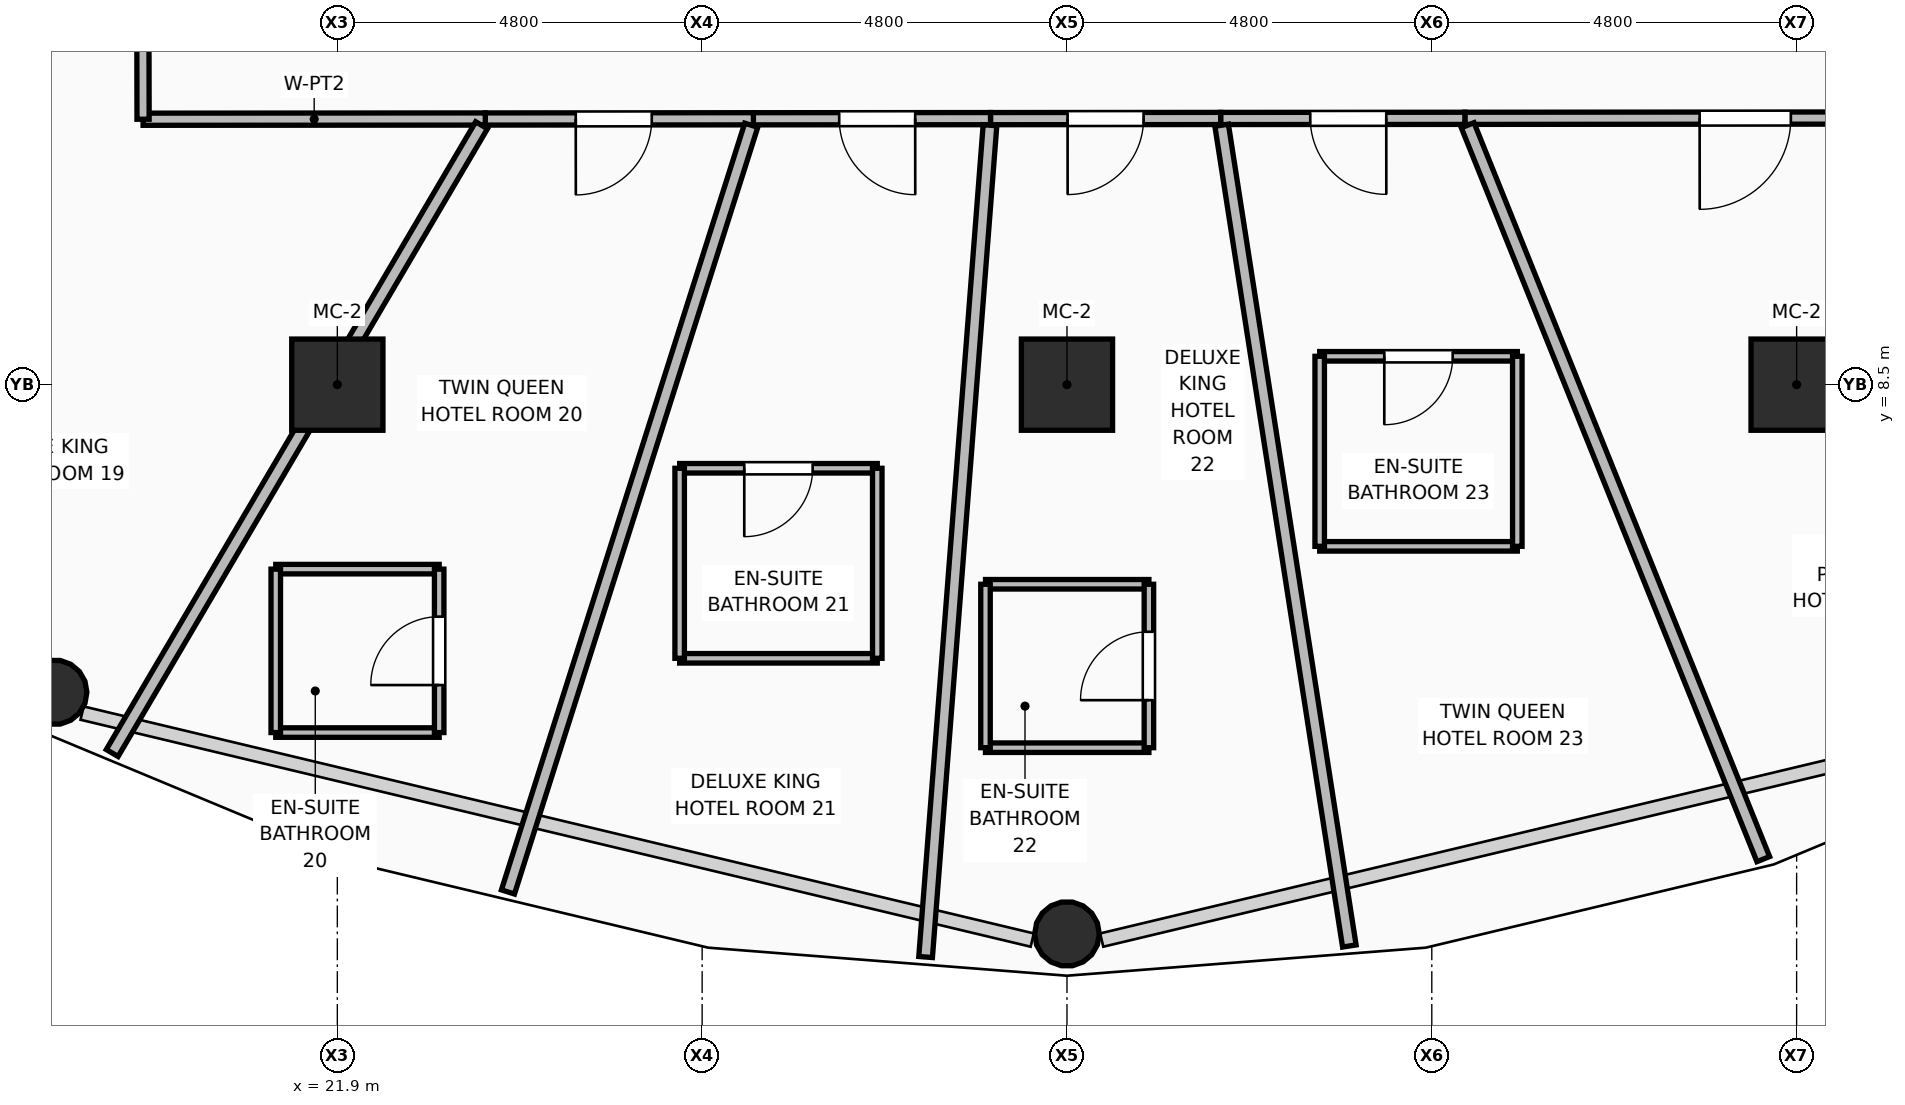
"""IFC4 building model, lengths in metres.
Left out: names, types, materials, properties, quantities, classifications, styles, units other than length and angle.
Written with IfcOpenShell. Run it as: python <this file> out.ifc"""

import sys

from ifc_helpers import new_model, si_unit, direction, frame, frame_2d, origin, origin_2d, place, context, subcontext, project, spatial, rectangle, hollow_rectangle, hollow_circle, extrude, element, fill, save


model = new_model("IFC4")
c1 = context("Model", 3, precision=1e-05, world=origin(), true_north=direction((0.0, 1.0)))
c2 = subcontext(c1, "Body", "Model", "MODEL_VIEW")
j1 = project(units=[si_unit("LENGTHUNIT", "METRE"), si_unit("PLANEANGLEUNIT", "RADIAN")], contexts=[c1])
p1 = place(None, origin())
s1 = spatial("IfcSite", under=j1, at=p1, CompositionType="ELEMENT")
p2 = place(p1, origin())
s2 = spatial("IfcBuilding", under=s1, at=p2, CompositionType="ELEMENT")
p3 = place(p2, frame((0.0, 0.0, 53.25)))
s3 = spatial("IfcBuildingStorey", under=s2, at=p3, CompositionType="ELEMENT", Elevation=53.25)
for number, where, z_axis, x_axis in (
    (1, (21.9, 8.5, 0.0), (0.0, 0.0, 1.0), (1.0, 0.0, 0.0)),
    (2, (31.5, 8.5, 0.0), (0.0, 0.0, 1.0), (1.0, 0.0, 0.0)),
    (3, (41.1, 8.5, 0.0), (0.0, 0.0, 1.0), (1.0, 0.0, 0.0)),
):
    element("IfcColumn", number, at=place(p3, frame(where, z_axis=z_axis, x_axis=x_axis)), inside=s3, PredefinedType="COLUMN", context=c2, shape_type="SweptSolid", body=[
        extrude(hollow_rectangle(XDim=1.2, YDim=1.2, WallThickness=0.045, at=origin_2d()), origin(), (0.0, 0.0, 1.0), 3.75),
    ])
p4 = place(p3, frame((18.18, 4.453, 0.0), z_axis=(-0.111309599924, -0.172151708361, 0.978761442985), x_axis=(0.839754063035, -0.542966954443, 0.0)))
e4 = element("IfcColumn", 4, at=p4, inside=s3, PredefinedType="COLUMN", context=c2, shape_type="SweptSolid", body=[
    extrude(hollow_circle(Radius=0.425, WallThickness=0.04, at=origin_2d()), origin(), (0.0, 0.0, 1.0), 3.647),
])
p5 = place(p3, frame((31.5, 1.274, 0.0), z_axis=(0.0, -0.198976453548, 0.980004270875), x_axis=(1.0, 0.0, 0.0)))
e5 = element("IfcColumn", 5, at=p5, inside=s3, PredefinedType="COLUMN", context=c2, shape_type="SweptSolid", body=[
    extrude(hollow_circle(Radius=0.425, WallThickness=0.04, at=origin_2d()), origin(), (0.0, 0.0, 1.0), 3.643),
])
p6 = place(p3, frame((43.673, 12.009, 0.0), z_axis=(0.0, 0.0, 1.0), x_axis=(-0.999999726963, -0.000738968058, 0.0)))
e6 = element("IfcWall", 6, at=p6, inside=s3, PredefinedType="PARTITIONING", context=c2, shape_type="SweptSolid", body=[
    extrude(rectangle(XDim=6.938, YDim=0.16, at=frame_2d((3.469, 0.0))), origin(), (0.0, 0.0, 1.0), 2.928),
])
p7 = place(p6, frame((2.649, 0.0, 0.0)))
e7 = element("IfcOpeningElement", 7, at=p7, cuts=e6, PredefinedType="OPENING", context=c2, shape_type="SweptSolid", body=[
    extrude(rectangle(XDim=1.2, YDim=2.1, at=frame_2d((0.6, 1.05))), frame((0.0, 0.09, 0.0), z_axis=(0.0, -1.0, 0.0), x_axis=(1.0, 0.0, 0.0)), (0.0, 0.0, 1.0), 0.18),
])
p8 = place(p3, frame((36.735, 12.004, 0.0), z_axis=(0.0, 0.0, 1.0), x_axis=(-0.999999815255, -0.000607856434, 0.0)))
e8 = element("IfcWall", 8, at=p8, inside=s3, PredefinedType="PARTITIONING", context=c2, shape_type="SweptSolid", body=[
    extrude(rectangle(XDim=3.213, YDim=0.16, at=frame_2d((1.606, 0.0))), origin(), (0.0, 0.0, 1.0), 3.55),
])
p9 = place(p8, frame((1.034, 0.0, 0.0)))
e9 = element("IfcOpeningElement", 9, at=p9, cuts=e8, PredefinedType="OPENING", context=c2, shape_type="SweptSolid", body=[
    extrude(rectangle(XDim=1.0, YDim=2.1, at=frame_2d((0.5, 1.05))), frame((0.0, 0.09, 0.0), z_axis=(0.0, -1.0, 0.0), x_axis=(1.0, 0.0, 0.0)), (0.0, 0.0, 1.0), 0.18),
])
p10 = place(p3, frame((33.522, 12.002, 0.0), z_axis=(0.0, 0.0, 1.0), x_axis=(-0.999999791984, -0.000645005106, 0.0)))
e10 = element("IfcWall", 10, at=p10, inside=s3, PredefinedType="PARTITIONING", context=c2, shape_type="SweptSolid", body=[
    extrude(rectangle(XDim=3.028, YDim=0.16, at=frame_2d((1.514, 0.0))), origin(), (0.0, 0.0, 1.0), 2.928),
])
p11 = place(p10, frame((1.014, 0.0, 0.0)))
e11 = element("IfcOpeningElement", 11, at=p11, cuts=e10, PredefinedType="OPENING", context=c2, shape_type="SweptSolid", body=[
    extrude(rectangle(XDim=1.0, YDim=2.1, at=frame_2d((0.5, 1.05))), frame((0.0, 0.09, 0.0), z_axis=(0.0, -1.0, 0.0), x_axis=(1.0, 0.0, 0.0)), (0.0, 0.0, 1.0), 0.18),
])
p12 = place(p3, frame((30.494, 12.0, 0.0), z_axis=(0.0, 0.0, 1.0), x_axis=(-0.999999804045, -0.000626026953, 0.0)))
e12 = element("IfcWall", 12, at=p12, inside=s3, PredefinedType="PARTITIONING", context=c2, shape_type="SweptSolid", body=[
    extrude(rectangle(XDim=3.12, YDim=0.16, at=frame_2d((1.56, 0.0))), origin(), (0.0, 0.0, 1.0), 3.55),
])
p13 = place(p12, frame((0.991, 0.0, 0.0)))
e13 = element("IfcOpeningElement", 13, at=p13, cuts=e12, PredefinedType="OPENING", context=c2, shape_type="SweptSolid", body=[
    extrude(rectangle(XDim=1.0, YDim=2.1, at=frame_2d((0.5, 1.05))), frame((0.0, 0.09, 0.0), z_axis=(0.0, -1.0, 0.0), x_axis=(1.0, 0.0, 0.0)), (0.0, 0.0, 1.0), 0.18),
])
p14 = place(p3, frame((27.374, 11.998, 0.0), z_axis=(0.0, 0.0, 1.0), x_axis=(-0.999999655033, -0.000830621988, 0.0)))
e14 = element("IfcWall", 14, at=p14, inside=s3, PredefinedType="PARTITIONING", context=c2, shape_type="SweptSolid", body=[
    extrude(rectangle(XDim=3.527, YDim=0.16, at=frame_2d((1.764, 0.0))), origin(), (0.0, 0.0, 1.0), 3.55),
])
p15 = place(p14, frame((1.337, 0.0, 0.0)))
e15 = element("IfcOpeningElement", 15, at=p15, cuts=e14, PredefinedType="OPENING", context=c2, shape_type="SweptSolid", body=[
    extrude(rectangle(XDim=1.0, YDim=2.1, at=frame_2d((0.5, 1.05))), frame((0.0, 0.09, 0.0), z_axis=(0.0, -1.0, 0.0), x_axis=(1.0, 0.0, 0.0)), (0.0, 0.0, 1.0), 0.18),
])
p16 = place(p3, frame((23.847, 11.995, 0.0), z_axis=(0.0, 0.0, 1.0), x_axis=(-0.999999751603, -0.000704836086, 0.0)))
e16 = element("IfcWall", 16, at=p16, inside=s3, PredefinedType="PARTITIONING", context=c2, shape_type="SweptSolid", body=[
    extrude(rectangle(XDim=4.503, YDim=0.16, at=frame_2d((2.251, 0.0))), origin(), (0.0, 0.0, 1.0), 2.928),
])
p17 = place(p3, frame((19.344, 11.992, 0.0), z_axis=(0.0, 0.0, 1.0), x_axis=(-0.001822295279, 0.999998339619, 0.0)))
e17 = element("IfcWall", 17, at=p17, inside=s3, PredefinedType="PARTITIONING", context=c2, shape_type="SweptSolid", body=[
    extrude(rectangle(XDim=4.421, YDim=0.16, at=frame_2d((2.21, 0.0))), origin(), (0.0, 0.0, 1.0), 3.55),
])
p18 = place(p17, frame((2.818, 0.0, 0.0)))
e18 = element("IfcOpeningElement", 18, at=p18, cuts=e17, PredefinedType="OPENING", context=c2, shape_type="SweptSolid", body=[
    extrude(rectangle(XDim=1.0, YDim=2.1, at=frame_2d((0.5, 1.05))), frame((0.0, 0.09, 0.0), z_axis=(0.0, -1.0, 0.0), x_axis=(1.0, 0.0, 0.0)), (0.0, 0.0, 1.0), 0.18),
])
p19 = place(p3, frame((19.248, 16.351, 0.0), z_axis=(0.0, 0.0, 1.0), x_axis=(-0.816958598031, -0.576696323123, 0.0)))
e19 = element("IfcWall", 19, at=p19, inside=s3, PredefinedType="PARTITIONING", context=c2, shape_type="SweptSolid", body=[
    extrude(rectangle(XDim=10.954, YDim=0.18, at=frame_2d((5.477, 0.0))), origin(), (0.0, 0.0, 1.0), 2.775),
])
p20 = place(p3, frame((23.798, 11.913, 0.0), z_axis=(0.0, 0.0, 1.0), x_axis=(-0.507163744978, -0.86184971763, 0.0)))
e20 = element("IfcWall", 20, at=p20, inside=s3, PredefinedType="PARTITIONING", context=c2, shape_type="SweptSolid", body=[
    extrude(rectangle(XDim=9.583, YDim=0.18, at=frame_2d((4.792, 0.0))), origin(), (0.0, 0.0, 1.0), 2.775),
])
p21 = place(p3, frame((27.346, 11.913, 0.0), z_axis=(0.0, 0.0, 1.0), x_axis=(-0.30246369842, -0.953160905166, 0.0)))
e21 = element("IfcWall", 21, at=p21, inside=s3, PredefinedType="PARTITIONING", context=c2, shape_type="SweptSolid", body=[
    extrude(rectangle(XDim=10.583, YDim=0.18, at=frame_2d((5.292, 0.0))), origin(), (0.0, 0.0, 1.0), 2.775),
])
p22 = place(p3, frame((30.487, 11.913, 0.0), z_axis=(0.0, 0.0, 1.0), x_axis=(-0.077184667338, -0.997016813864, 0.0)))
e22 = element("IfcWall", 22, at=p22, inside=s3, PredefinedType="PARTITIONING", context=c2, shape_type="SweptSolid", body=[
    extrude(rectangle(XDim=10.976, YDim=0.18, at=frame_2d((5.488, 0.0))), origin(), (0.0, 0.0, 1.0), 2.775),
])
p23 = place(p3, frame((33.535, 11.913, 0.0), z_axis=(0.0, 0.0, 1.0), x_axis=(0.153749177846, -0.988109908012, 0.0)))
e23 = element("IfcWall", 23, at=p23, inside=s3, PredefinedType="PARTITIONING", context=c2, shape_type="SweptSolid", body=[
    extrude(rectangle(XDim=10.928, YDim=0.18, at=frame_2d((5.464, 0.0))), origin(), (0.0, 0.0, 1.0), 2.775),
])
p24 = place(p3, frame((36.772, 11.913, 0.0), z_axis=(0.0, 0.0, 1.0), x_axis=(0.373617850664, -0.927582719581, 0.0)))
e24 = element("IfcWall", 24, at=p24, inside=s3, PredefinedType="PARTITIONING", context=c2, shape_type="SweptSolid", body=[
    extrude(rectangle(XDim=10.409, YDim=0.18, at=frame_2d((5.204, 0.0))), origin(), (0.0, 0.0, 1.0), 2.775),
])
for number, where, z_axis, x_axis in (
    (25, (21.09, 3.923, 0.0), (0.0, 0.0, 1.0), (1.0, 0.0, 0.0)),
    (26, (21.09, 6.073, 0.0), (0.0, 0.0, 1.0), (1.0, 0.0, 0.0)),
    (27, (21.09, 3.923, 0.0), (0.0, 0.0, 1.0), (0.0, 1.0, 0.0)),
):
    element("IfcWall", number, at=place(p3, frame(where, z_axis=z_axis, x_axis=x_axis)), inside=s3, PredefinedType="PARTITIONING", context=c2, shape_type="SweptSolid", body=[
        extrude(rectangle(XDim=2.15, YDim=0.125, at=frame_2d((1.075, 0.0))), origin(), (0.0, 0.0, 1.0), 3.55),
    ])
p25 = place(p3, frame((23.24, 3.923, 0.0), z_axis=(0.0, 0.0, 1.0), x_axis=(0.0, 1.0, 0.0)))
e28 = element("IfcWall", 28, at=p25, inside=s3, PredefinedType="PARTITIONING", context=c2, shape_type="SweptSolid", body=[
    extrude(rectangle(XDim=2.15, YDim=0.125, at=frame_2d((1.075, 0.0))), origin(), (0.0, 0.0, 1.0), 3.55),
])
p26 = place(p25, frame((0.625, 0.0, 0.0)))
e29 = element("IfcOpeningElement", 29, at=p26, cuts=e28, PredefinedType="OPENING", context=c2, shape_type="SweptSolid", body=[
    extrude(rectangle(XDim=0.9, YDim=2.1, at=frame_2d((0.45, 1.05))), frame((0.0, 0.073, 0.0), z_axis=(0.0, -1.0, 0.0), x_axis=(1.0, 0.0, 0.0)), (0.0, 0.0, 1.0), 0.145),
])
p27 = place(p3, frame((26.404, 4.9, 0.0), z_axis=(0.0, 0.0, 1.0), x_axis=(1.0, 0.0, 0.0)))
e30 = element("IfcWall", 30, at=p27, inside=s3, PredefinedType="PARTITIONING", context=c2, shape_type="SweptSolid", body=[
    extrude(rectangle(XDim=2.6, YDim=0.125, at=frame_2d((1.3, 0.0))), origin(), (0.0, 0.0, 1.0), 3.55),
])
p28 = place(p3, frame((26.404, 7.4, 0.0), z_axis=(0.0, 0.0, 1.0), x_axis=(1.0, 0.0, 0.0)))
e31 = element("IfcWall", 31, at=p28, inside=s3, PredefinedType="PARTITIONING", context=c2, shape_type="SweptSolid", body=[
    extrude(rectangle(XDim=2.6, YDim=0.125, at=frame_2d((1.3, 0.0))), origin(), (0.0, 0.0, 1.0), 3.55),
])
p29 = place(p28, frame((0.85, 0.0, 0.0)))
e32 = element("IfcOpeningElement", 32, at=p29, cuts=e31, PredefinedType="OPENING", context=c2, shape_type="SweptSolid", body=[
    extrude(rectangle(XDim=0.9, YDim=2.1, at=frame_2d((0.45, 1.05))), frame((0.0, 0.073, 0.0), z_axis=(0.0, -1.0, 0.0), x_axis=(1.0, 0.0, 0.0)), (0.0, 0.0, 1.0), 0.145),
])
for number, where, z_axis, x_axis in (
    (33, (26.404, 4.9, 0.0), (0.0, 0.0, 1.0), (0.0, 1.0, 0.0)),
    (34, (29.004, 4.9, 0.0), (0.0, 0.0, 1.0), (0.0, 1.0, 0.0)),
):
    element("IfcWall", number, at=place(p3, frame(where, z_axis=z_axis, x_axis=x_axis)), inside=s3, PredefinedType="PARTITIONING", context=c2, shape_type="SweptSolid", body=[
        extrude(rectangle(XDim=2.5, YDim=0.125, at=frame_2d((1.25, 0.0))), origin(), (0.0, 0.0, 1.0), 3.55),
    ])
for number, where, z_axis, x_axis in (
    (35, (30.428, 3.724, 0.0), (0.0, 0.0, 1.0), (1.0, 0.0, 0.0)),
    (36, (30.428, 5.874, 0.0), (0.0, 0.0, 1.0), (1.0, 0.0, 0.0)),
):
    element("IfcWall", number, at=place(p3, frame(where, z_axis=z_axis, x_axis=x_axis)), inside=s3, PredefinedType="PARTITIONING", context=c2, shape_type="SweptSolid", body=[
        extrude(rectangle(XDim=2.15, YDim=0.125, at=frame_2d((1.075, 0.0))), origin(), (0.0, 0.0, 1.0), 2.928),
    ])
p30 = place(p3, frame((30.428, 3.724, 0.0), z_axis=(0.0, 0.0, 1.0), x_axis=(0.0, 1.0, 0.0)))
e37 = element("IfcWall", 37, at=p30, inside=s3, PredefinedType="PARTITIONING", context=c2, shape_type="SweptSolid", body=[
    extrude(rectangle(XDim=2.15, YDim=0.125, at=frame_2d((1.075, 0.0))), origin(), (0.0, 0.0, 1.0), 3.55),
])
p31 = place(p3, frame((32.578, 3.724, 0.0), z_axis=(0.0, 0.0, 1.0), x_axis=(0.0, 1.0, 0.0)))
e38 = element("IfcWall", 38, at=p31, inside=s3, PredefinedType="PARTITIONING", context=c2, shape_type="SweptSolid", body=[
    extrude(rectangle(XDim=2.15, YDim=0.125, at=frame_2d((1.075, 0.0))), origin(), (0.0, 0.0, 1.0), 3.55),
])
p32 = place(p31, frame((0.625, 0.0, 0.0)))
e39 = element("IfcOpeningElement", 39, at=p32, cuts=e38, PredefinedType="OPENING", context=c2, shape_type="SweptSolid", body=[
    extrude(rectangle(XDim=0.9, YDim=2.1, at=frame_2d((0.45, 1.05))), frame((0.0, 0.073, 0.0), z_axis=(0.0, -1.0, 0.0), x_axis=(1.0, 0.0, 0.0)), (0.0, 0.0, 1.0), 0.145),
])
p33 = place(p3, frame((34.825, 6.373, 0.0), z_axis=(0.0, 0.0, 1.0), x_axis=(1.0, 0.0, 0.0)))
e40 = element("IfcWall", 40, at=p33, inside=s3, PredefinedType="PARTITIONING", context=c2, shape_type="SweptSolid", body=[
    extrude(rectangle(XDim=2.6, YDim=0.125, at=frame_2d((1.3, 0.0))), origin(), (0.0, 0.0, 1.0), 3.55),
])
p34 = place(p3, frame((34.825, 8.873, 0.0), z_axis=(0.0, 0.0, 1.0), x_axis=(1.0, 0.0, 0.0)))
e41 = element("IfcWall", 41, at=p34, inside=s3, PredefinedType="PARTITIONING", context=c2, shape_type="SweptSolid", body=[
    extrude(rectangle(XDim=2.6, YDim=0.125, at=frame_2d((1.3, 0.0))), origin(), (0.0, 0.0, 1.0), 3.55),
])
p35 = place(p34, frame((0.85, 0.0, 0.0)))
e42 = element("IfcOpeningElement", 42, at=p35, cuts=e41, PredefinedType="OPENING", context=c2, shape_type="SweptSolid", body=[
    extrude(rectangle(XDim=0.9, YDim=2.1, at=frame_2d((0.45, 1.05))), frame((0.0, 0.073, 0.0), z_axis=(0.0, -1.0, 0.0), x_axis=(1.0, 0.0, 0.0)), (0.0, 0.0, 1.0), 0.145),
])
for number, where, z_axis, x_axis in (
    (43, (34.825, 6.373, 0.0), (0.0, 0.0, 1.0), (0.0, 1.0, 0.0)),
    (44, (37.425, 6.373, 0.0), (0.0, 0.0, 1.0), (0.0, 1.0, 0.0)),
):
    element("IfcWall", number, at=place(p3, frame(where, z_axis=z_axis, x_axis=x_axis)), inside=s3, PredefinedType="PARTITIONING", context=c2, shape_type="SweptSolid", body=[
        extrude(rectangle(XDim=2.5, YDim=0.125, at=frame_2d((1.25, 0.0))), origin(), (0.0, 0.0, 1.0), 3.55),
    ])
p36 = place(p26, origin())
e45 = element("IfcDoor", 45, at=p36, inside=s3, OperationType="SINGLE_SWING_LEFT", PredefinedType="DOOR", context=c2, shape_type="SweptSolid", body=[
    extrude(rectangle(XDim=0.9, YDim=2.1, at=frame_2d((0.45, 1.05))), frame((0.0, 0.025, 0.0), z_axis=(0.0, -1.0, 0.0), x_axis=(1.0, 0.0, 0.0)), (0.0, 0.0, 1.0), 0.05),
])
fill(e29, e45)
p37 = place(p15, origin())
e46 = element("IfcDoor", 46, at=p37, inside=s3, OperationType="SINGLE_SWING_RIGHT", PredefinedType="DOOR", context=c2, shape_type="SweptSolid", body=[
    extrude(rectangle(XDim=1.0, YDim=2.1, at=frame_2d((0.5, 1.05))), frame((0.0, 0.025, 0.0), z_axis=(0.0, -1.0, 0.0), x_axis=(1.0, 0.0, 0.0)), (0.0, 0.0, 1.0), 0.05),
])
fill(e15, e46)
p38 = place(p29, frame((0.9, 0.0, 0.0), z_axis=(0.0, 0.0, 1.0), x_axis=(-1.0, 0.0, 0.0)))
e47 = element("IfcDoor", 47, at=p38, inside=s3, OperationType="SINGLE_SWING_RIGHT", PredefinedType="DOOR", context=c2, shape_type="SweptSolid", body=[
    extrude(rectangle(XDim=0.9, YDim=2.1, at=frame_2d((0.45, 1.05))), frame((0.0, 0.025, 0.0), z_axis=(0.0, -1.0, 0.0), x_axis=(1.0, 0.0, 0.0)), (0.0, 0.0, 1.0), 0.05),
])
fill(e32, e47)
p39 = place(p13, origin())
e48 = element("IfcDoor", 48, at=p39, inside=s3, OperationType="SINGLE_SWING_LEFT", PredefinedType="DOOR", context=c2, shape_type="SweptSolid", body=[
    extrude(rectangle(XDim=1.0, YDim=2.1, at=frame_2d((0.5, 1.05))), frame((0.0, 0.025, 0.0), z_axis=(0.0, -1.0, 0.0), x_axis=(1.0, 0.0, 0.0)), (0.0, 0.0, 1.0), 0.05),
])
fill(e13, e48)
p40 = place(p32, origin())
e49 = element("IfcDoor", 49, at=p40, inside=s3, OperationType="SINGLE_SWING_LEFT", PredefinedType="DOOR", context=c2, shape_type="SweptSolid", body=[
    extrude(rectangle(XDim=0.9, YDim=2.1, at=frame_2d((0.45, 1.05))), frame((0.0, 0.025, 0.0), z_axis=(0.0, -1.0, 0.0), x_axis=(1.0, 0.0, 0.0)), (0.0, 0.0, 1.0), 0.05),
])
fill(e39, e49)
p41 = place(p11, origin())
e50 = element("IfcDoor", 50, at=p41, inside=s3, OperationType="SINGLE_SWING_RIGHT", PredefinedType="DOOR", context=c2, shape_type="SweptSolid", body=[
    extrude(rectangle(XDim=1.0, YDim=2.1, at=frame_2d((0.5, 1.05))), frame((0.0, 0.025, 0.0), z_axis=(0.0, -1.0, 0.0), x_axis=(1.0, 0.0, 0.0)), (0.0, 0.0, 1.0), 0.05),
])
fill(e11, e50)
p42 = place(p35, frame((0.9, 0.0, 0.0), z_axis=(0.0, 0.0, 1.0), x_axis=(-1.0, 0.0, 0.0)))
e51 = element("IfcDoor", 51, at=p42, inside=s3, OperationType="SINGLE_SWING_RIGHT", PredefinedType="DOOR", context=c2, shape_type="SweptSolid", body=[
    extrude(rectangle(XDim=0.9, YDim=2.1, at=frame_2d((0.45, 1.05))), frame((0.0, 0.025, 0.0), z_axis=(0.0, -1.0, 0.0), x_axis=(1.0, 0.0, 0.0)), (0.0, 0.0, 1.0), 0.05),
])
fill(e42, e51)
p43 = place(p9, origin())
e52 = element("IfcDoor", 52, at=p43, inside=s3, OperationType="SINGLE_SWING_LEFT", PredefinedType="DOOR", context=c2, shape_type="SweptSolid", body=[
    extrude(rectangle(XDim=1.0, YDim=2.1, at=frame_2d((0.5, 1.05))), frame((0.0, 0.025, 0.0), z_axis=(0.0, -1.0, 0.0), x_axis=(1.0, 0.0, 0.0)), (0.0, 0.0, 1.0), 0.05),
])
fill(e9, e52)
p44 = place(p7, origin())
e53 = element("IfcDoor", 53, at=p44, inside=s3, OperationType="SINGLE_SWING_RIGHT", PredefinedType="DOOR", context=c2, shape_type="SweptSolid", body=[
    extrude(rectangle(XDim=1.2, YDim=2.1, at=frame_2d((0.6, 1.05))), frame((0.0, 0.025, 0.0), z_axis=(0.0, -1.0, 0.0), x_axis=(1.0, 0.0, 0.0)), (0.0, 0.0, 1.0), 0.05),
])
fill(e7, e53)
save(model, sys.argv[1])
